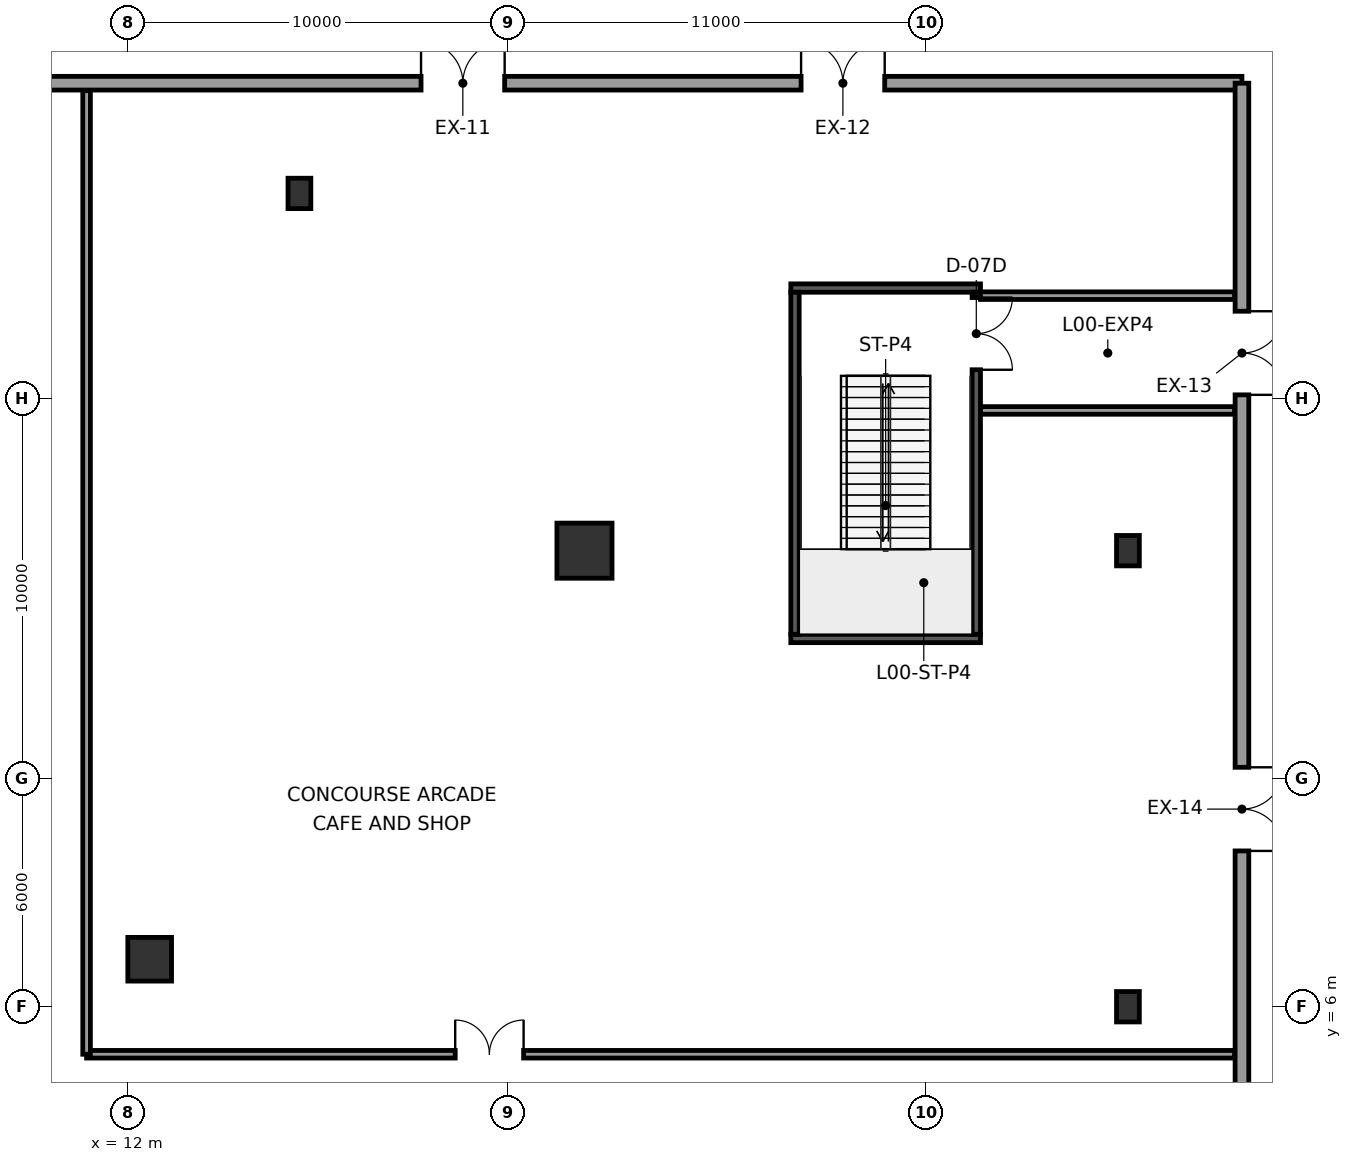
"""IFC4 building model, lengths in metres.
Left out: names, types, materials, properties, quantities, classifications, styles, units other than length and angle.
Written with IfcOpenShell. Run it as: python <this file> out.ifc"""

import sys

from ifc_helpers import new_model, si_unit, direction, frame, frame_2d, origin, origin_2d, place, context, subcontext, project, spatial, rectangle, hollow_rectangle, extrude, element, fill, save


model = new_model("IFC4")
c1 = context("Model", 3, precision=1e-05, world=origin(), true_north=direction((0.0, 1.0)))
c2 = subcontext(c1, "Body", "Model", "MODEL_VIEW")
j1 = project(units=[si_unit("LENGTHUNIT", "METRE"), si_unit("PLANEANGLEUNIT", "RADIAN")], contexts=[c1])
p1 = place(None, origin())
s1 = spatial("IfcSite", under=j1, at=p1, CompositionType="ELEMENT")
p2 = place(p1, origin())
s2 = spatial("IfcBuilding", under=s1, at=p2, CompositionType="ELEMENT")
p3 = place(p2, origin())
s3 = spatial("IfcBuildingStorey", under=s2, at=p3, CompositionType="ELEMENT", Elevation=0.0)
p4 = place(p3, frame((12.56, 7.25, 0.0), z_axis=(0.0, 0.0, 1.0), x_axis=(1.0, 0.0, 0.0)))
e1 = element("IfcColumn", 1, at=p4, inside=s3, PredefinedType="COLUMN", context=c2, shape_type="SweptSolid", body=[
    extrude(rectangle(XDim=1.15, YDim=1.15, at=origin_2d()), origin(), (0.0, 0.0, 1.0), 6.0),
])
p5 = place(p3, frame((24.0, 18.0, 0.0), z_axis=(0.0, 0.0, 1.0), x_axis=(1.0, 0.0, 0.0)))
e2 = element("IfcColumn", 2, at=p5, inside=s3, PredefinedType="COLUMN", context=c2, shape_type="SweptSolid", body=[
    extrude(rectangle(XDim=1.45, YDim=1.45, at=origin_2d()), origin(), (0.0, 0.0, 1.0), 6.0),
])
for number, where, z_axis, x_axis in (
    (3, (38.3, 6.0, 0.0), (0.0, 0.0, 1.0), (1.0, 0.0, 0.0)),
    (4, (38.3, 18.0, 0.0), (0.0, 0.0, 1.0), (1.0, 0.0, 0.0)),
    (5, (16.5, 27.4, 0.0), (0.0, 0.0, 1.0), (1.0, 0.0, 0.0)),
):
    element("IfcColumn", number, at=place(p3, frame(where, z_axis=z_axis, x_axis=x_axis)), inside=s3, PredefinedType="COLUMN", context=c2, shape_type="SweptSolid", body=[
        extrude(hollow_rectangle(XDim=0.6, YDim=0.8, WallThickness=0.05, at=origin_2d()), origin(), (0.0, 0.0, 1.0), 6.0),
    ])
p6 = place(p3, frame((-41.3, 30.3, 0.0), z_axis=(0.0, 0.0, 1.0), x_axis=(1.0, 0.0, 0.0)))
e6 = element("IfcWall", 6, at=p6, inside=s3, PredefinedType="STANDARD", context=c2, shape_type="SweptSolid", body=[
    extrude(rectangle(XDim=82.6, YDim=0.36, at=frame_2d((41.3, 0.0))), origin(), (0.0, 0.0, 1.0), 5.7),
])
p7 = place(p6, frame((17.4, 0.0, 0.0)))
e7 = element("IfcOpeningElement", 7, at=p7, cuts=e6, PredefinedType="OPENING", context=c2, shape_type="SweptSolid", body=[
    extrude(rectangle(XDim=2.2, YDim=2.4, at=frame_2d((1.1, 1.2))), frame((0.0, 0.19, 0.0), z_axis=(0.0, -1.0, 0.0), x_axis=(1.0, 0.0, 0.0)), (0.0, 0.0, 1.0), 0.38),
])
p8 = place(p6, frame((33.4, 0.0, 0.0)))
e8 = element("IfcOpeningElement", 8, at=p8, cuts=e6, PredefinedType="OPENING", context=c2, shape_type="SweptSolid", body=[
    extrude(rectangle(XDim=2.2, YDim=2.4, at=frame_2d((1.1, 1.2))), frame((0.0, 0.19, 0.0), z_axis=(0.0, -1.0, 0.0), x_axis=(1.0, 0.0, 0.0)), (0.0, 0.0, 1.0), 0.38),
])
p9 = place(p6, frame((61.0, 0.0, 0.0)))
e9 = element("IfcOpeningElement", 9, at=p9, cuts=e6, PredefinedType="OPENING", context=c2, shape_type="SweptSolid", body=[
    extrude(rectangle(XDim=2.2, YDim=2.4, at=frame_2d((1.1, 1.2))), frame((0.0, 0.19, 0.0), z_axis=(0.0, -1.0, 0.0), x_axis=(1.0, 0.0, 0.0)), (0.0, 0.0, 1.0), 0.38),
])
p10 = place(p6, frame((71.0, 0.0, 0.0)))
e10 = element("IfcOpeningElement", 10, at=p10, cuts=e6, PredefinedType="OPENING", context=c2, shape_type="SweptSolid", body=[
    extrude(rectangle(XDim=2.2, YDim=2.4, at=frame_2d((1.1, 1.2))), frame((0.0, 0.19, 0.0), z_axis=(0.0, -1.0, 0.0), x_axis=(1.0, 0.0, 0.0)), (0.0, 0.0, 1.0), 0.38),
])
p11 = place(p3, frame((41.3, 30.3, 0.0), z_axis=(0.0, 0.0, 1.0), x_axis=(0.0, -1.0, 0.0)))
e11 = element("IfcWall", 11, at=p11, inside=s3, PredefinedType="STANDARD", context=c2, shape_type="SweptSolid", body=[
    extrude(rectangle(XDim=60.6, YDim=0.36, at=frame_2d((30.3, 0.0))), origin(), (0.0, 0.0, 1.0), 5.7),
])
p12 = place(p11, frame((6.0, 0.0, 0.0)))
e12 = element("IfcOpeningElement", 12, at=p12, cuts=e11, PredefinedType="OPENING", context=c2, shape_type="SweptSolid", body=[
    extrude(rectangle(XDim=2.2, YDim=2.4, at=frame_2d((1.1, 1.2))), frame((0.0, 0.19, 0.0), z_axis=(0.0, -1.0, 0.0), x_axis=(1.0, 0.0, 0.0)), (0.0, 0.0, 1.0), 0.38),
])
p13 = place(p11, frame((18.0, 0.0, 0.0)))
e13 = element("IfcOpeningElement", 13, at=p13, cuts=e11, PredefinedType="OPENING", context=c2, shape_type="SweptSolid", body=[
    extrude(rectangle(XDim=2.2, YDim=2.4, at=frame_2d((1.1, 1.2))), frame((0.0, 0.19, 0.0), z_axis=(0.0, -1.0, 0.0), x_axis=(1.0, 0.0, 0.0)), (0.0, 0.0, 1.0), 0.38),
])
p14 = place(p11, frame((52.4, 0.0, 0.0)))
e14 = element("IfcOpeningElement", 14, at=p14, cuts=e11, PredefinedType="OPENING", context=c2, shape_type="SweptSolid", body=[
    extrude(rectangle(XDim=2.2, YDim=2.4, at=frame_2d((1.1, 1.2))), frame((0.0, 0.19, 0.0), z_axis=(0.0, -1.0, 0.0), x_axis=(1.0, 0.0, 0.0)), (0.0, 0.0, 1.0), 0.38),
])
for number, where, z_axis, x_axis in (
    (15, (29.43, 15.69, 0.0), (0.0, 0.0, 1.0), (1.0, 0.0, 0.0)),
    (16, (29.43, 24.91, 0.0), (0.0, 0.0, 1.0), (1.0, 0.0, 0.0)),
):
    element("IfcWall", number, at=place(p3, frame(where, z_axis=z_axis, x_axis=x_axis)), inside=s3, PredefinedType="SHEAR", context=c2, shape_type="SweptSolid", body=[
        extrude(rectangle(XDim=4.99, YDim=0.22, at=frame_2d((2.495, 0.0))), origin(), (0.0, 0.0, 1.0), 5.7),
    ])
p15 = place(p3, frame((29.54, 15.8, 0.0), z_axis=(0.0, 0.0, 1.0), x_axis=(0.0, 1.0, 0.0)))
e17 = element("IfcWall", 17, at=p15, inside=s3, PredefinedType="SHEAR", context=c2, shape_type="SweptSolid", body=[
    extrude(rectangle(XDim=9.0, YDim=0.22, at=frame_2d((4.5, 0.0))), origin(), (0.0, 0.0, 1.0), 5.7),
])
p16 = place(p3, frame((34.31, 24.8, 0.0), z_axis=(0.0, 0.0, 1.0), x_axis=(0.0, -1.0, 0.0)))
e18 = element("IfcWall", 18, at=p16, inside=s3, PredefinedType="SHEAR", context=c2, shape_type="SweptSolid", body=[
    extrude(rectangle(XDim=9.0, YDim=0.22, at=frame_2d((4.5, 0.0))), origin(), (0.0, 0.0, 1.0), 5.7),
])
p17 = place(p16, frame((0.14, 0.0, 0.0)))
e19 = element("IfcOpeningElement", 19, at=p17, cuts=e18, PredefinedType="OPENING", context=c2, shape_type="SweptSolid", body=[
    extrude(rectangle(XDim=1.9, YDim=2.2, at=frame_2d((0.95, 1.1))), frame((0.0, 0.12, 0.0), z_axis=(0.0, -1.0, 0.0), x_axis=(1.0, 0.0, 0.0)), (0.0, 0.0, 1.0), 0.24),
])
for number, where, z_axis, x_axis in (
    (20, (34.42, 21.69, 0.0), (0.0, 0.0, 1.0), (1.0, 0.0, 0.0)),
    (21, (34.42, 24.71, 0.0), (0.0, 0.0, 1.0), (1.0, 0.0, 0.0)),
):
    element("IfcWall", number, at=place(p3, frame(where, z_axis=z_axis, x_axis=x_axis)), inside=s3, PredefinedType="PARTITIONING", context=c2, shape_type="SweptSolid", body=[
        extrude(rectangle(XDim=6.685, YDim=0.2, at=frame_2d((3.343, 0.0))), origin(), (0.0, 0.0, 1.0), 5.7),
    ])
p18 = place(p3, frame((10.9, 4.75, 0.0), z_axis=(0.0, 0.0, 1.0), x_axis=(1.0, 0.0, 0.0)))
e22 = element("IfcWall", 22, at=p18, inside=s3, PredefinedType="PARTITIONING", context=c2, shape_type="SweptSolid", body=[
    extrude(rectangle(XDim=30.205, YDim=0.2, at=frame_2d((15.103, 0.0))), origin(), (0.0, 0.0, 1.0), 5.7),
])
p19 = place(p18, frame((9.699, 0.0, 0.0)))
e23 = element("IfcOpeningElement", 23, at=p19, cuts=e22, PredefinedType="OPENING", context=c2, shape_type="SweptSolid", body=[
    extrude(rectangle(XDim=1.8, YDim=2.2, at=frame_2d((0.9, 1.1))), frame((0.0, 0.11, 0.0), z_axis=(0.0, -1.0, 0.0), x_axis=(1.0, 0.0, 0.0)), (0.0, 0.0, 1.0), 0.22),
])
p20 = place(p3, frame((10.9, 4.75, 0.0), z_axis=(0.0, 0.0, 1.0), x_axis=(0.0, 1.0, 0.0)))
e24 = element("IfcWall", 24, at=p20, inside=s3, PredefinedType="PARTITIONING", context=c2, shape_type="SweptSolid", body=[
    extrude(rectangle(XDim=25.355, YDim=0.2, at=frame_2d((12.677, 0.0))), origin(), (0.0, 0.0, 1.0), 5.7),
])
p21 = place(p9, origin())
e25 = element("IfcDoor", 25, at=p21, inside=s3, OperationType="DOUBLE_DOOR_SINGLE_SWING", PredefinedType="DOOR", context=c2, shape_type="SweptSolid", body=[
    extrude(rectangle(XDim=2.2, YDim=2.4, at=frame_2d((1.1, 1.2))), frame((0.0, 0.025, 0.0), z_axis=(0.0, -1.0, 0.0), x_axis=(1.0, 0.0, 0.0)), (0.0, 0.0, 1.0), 0.05),
])
fill(e9, e25)
p22 = place(p10, origin())
e26 = element("IfcDoor", 26, at=p22, inside=s3, OperationType="DOUBLE_DOOR_SINGLE_SWING", PredefinedType="DOOR", context=c2, shape_type="SweptSolid", body=[
    extrude(rectangle(XDim=2.2, YDim=2.4, at=frame_2d((1.1, 1.2))), frame((0.0, 0.025, 0.0), z_axis=(0.0, -1.0, 0.0), x_axis=(1.0, 0.0, 0.0)), (0.0, 0.0, 1.0), 0.05),
])
fill(e10, e26)
p23 = place(p12, origin())
e27 = element("IfcDoor", 27, at=p23, inside=s3, OperationType="DOUBLE_DOOR_SINGLE_SWING", PredefinedType="DOOR", context=c2, shape_type="SweptSolid", body=[
    extrude(rectangle(XDim=2.2, YDim=2.4, at=frame_2d((1.1, 1.2))), frame((0.0, 0.025, 0.0), z_axis=(0.0, -1.0, 0.0), x_axis=(1.0, 0.0, 0.0)), (0.0, 0.0, 1.0), 0.05),
])
fill(e12, e27)
p24 = place(p13, origin())
e28 = element("IfcDoor", 28, at=p24, inside=s3, OperationType="DOUBLE_DOOR_SINGLE_SWING", PredefinedType="DOOR", context=c2, shape_type="SweptSolid", body=[
    extrude(rectangle(XDim=2.2, YDim=2.4, at=frame_2d((1.1, 1.2))), frame((0.0, 0.025, 0.0), z_axis=(0.0, -1.0, 0.0), x_axis=(1.0, 0.0, 0.0)), (0.0, 0.0, 1.0), 0.05),
])
fill(e13, e28)
p25 = place(p17, origin())
e29 = element("IfcDoor", 29, at=p25, inside=s3, OperationType="DOUBLE_DOOR_SINGLE_SWING", PredefinedType="DOOR", context=c2, shape_type="SweptSolid", body=[
    extrude(rectangle(XDim=1.9, YDim=2.2, at=frame_2d((0.95, 1.1))), frame((0.0, 0.025, 0.0), z_axis=(0.0, -1.0, 0.0), x_axis=(1.0, 0.0, 0.0)), (0.0, 0.0, 1.0), 0.05),
])
fill(e19, e29)
p26 = place(p19, origin())
e30 = element("IfcDoor", 30, at=p26, inside=s3, OperationType="DOUBLE_DOOR_SINGLE_SWING", PredefinedType="DOOR", context=c2, shape_type="SweptSolid", body=[
    extrude(rectangle(XDim=1.8, YDim=2.2, at=frame_2d((0.9, 1.1))), frame((0.0, 0.025, 0.0), z_axis=(0.0, -1.0, 0.0), x_axis=(1.0, 0.0, 0.0)), (0.0, 0.0, 1.0), 0.05),
])
fill(e23, e30)
save(model, sys.argv[1])
